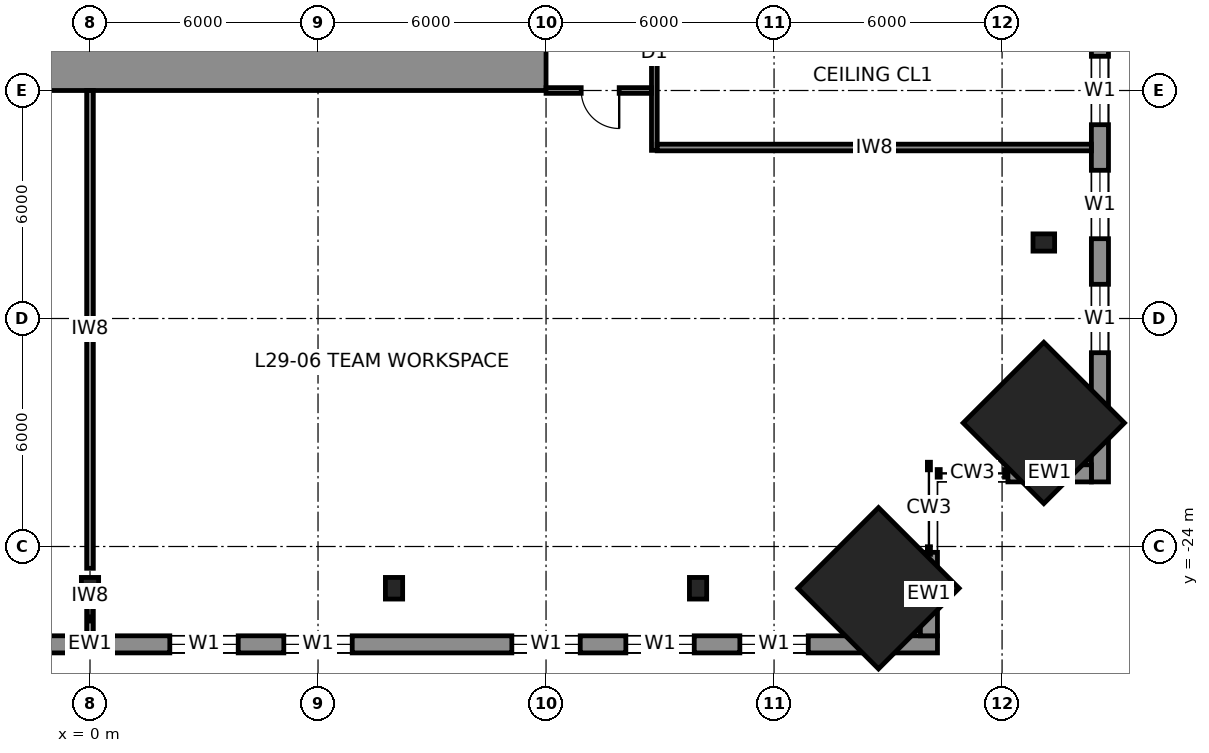
"""IFC4 building model, lengths in metres.
Left out: names, types, materials, properties, quantities, classifications, styles, units other than length and angle.
Written with IfcOpenShell. Run it as: python <this file> out.ifc"""

import sys

from ifc_helpers import new_model, si_unit, direction, frame, frame_2d, origin, origin_2d, place, context, subcontext, project, spatial, rectangle, i_section, extrude, element, fill, save


model = new_model("IFC4")
c1 = context("Model", 3, precision=1e-05, world=origin(), true_north=direction((0.0, 1.0)))
c2 = subcontext(c1, "Body", "Model", "MODEL_VIEW")
j1 = project(units=[si_unit("LENGTHUNIT", "METRE"), si_unit("PLANEANGLEUNIT", "RADIAN")], contexts=[c1])
p1 = place(None, origin())
s1 = spatial("IfcSite", under=j1, at=p1, CompositionType="ELEMENT")
p2 = place(p1, origin())
s2 = spatial("IfcBuilding", under=s1, at=p2, CompositionType="ELEMENT")
p3 = place(p2, frame((0.0, 0.0, 143.8)))
s3 = spatial("IfcBuildingStorey", under=s2, at=p3, CompositionType="ELEMENT", Elevation=143.8)
for number, where, z_axis, x_axis in (
    (1, (25.098, -20.748, 0.0), (-0.04, 0.04, 0.998), (-0.707, -0.708, 0.0)),
    (2, (20.748, -25.098, 0.0), (-0.04, 0.04, 0.998), (-0.708, -0.707, 0.0)),
):
    element("IfcColumn", number, at=place(p3, frame(where, z_axis=z_axis, x_axis=x_axis)), inside=s3, PredefinedType="COLUMN", context=c2, shape_type="SweptSolid", body=[
        extrude(rectangle(XDim=3.0, YDim=3.0, at=origin_2d()), origin(), (0.0, 0.0, 1.0), 4.007),
    ])
for number, where, z_axis, x_axis in (
    (3, (25.098, -16.0, 0.0), (-0.04, 0.0, 0.999), (0.0, -1.0, 0.0)),
    (4, (0.0, -25.098, 0.0), (0.0, 0.04, 0.999), (-1.0, 0.0, 0.0)),
    (5, (8.0, -25.098, 0.0), (0.0, 0.04, 0.999), (-1.0, 0.0, 0.0)),
    (6, (16.0, -25.098, 0.0), (0.0, 0.04, 0.999), (-1.0, 0.0, 0.0)),
):
    element("IfcColumn", number, at=place(p3, frame(where, z_axis=z_axis, x_axis=x_axis)), inside=s3, PredefinedType="COLUMN", context=c2, shape_type="SweptSolid", body=[
        extrude(i_section(OverallWidth=0.454, OverallDepth=0.569, WebThickness=0.078, FlangeThickness=0.125, at=origin_2d()), origin(), (0.0, 0.0, 1.0), 4.003),
    ])
p4 = place(p3, frame((12.0, -11.25, 0.0), z_axis=(0.0, 0.0, 1.0), x_axis=(-1.0, 0.0, 0.0)))
e7 = element("IfcWall", 7, at=p4, inside=s3, PredefinedType="SHEAR", context=c2, shape_type="SweptSolid", body=[
    extrude(rectangle(XDim=24.0, YDim=1.5, at=frame_2d((12.0, 0.0))), origin(), (0.0, 0.0, 1.0), 4.0),
])
p5 = place(p3, frame((26.575, -22.3, 0.0), z_axis=(0.0, 0.0, 1.0), x_axis=(0.0, 1.0, 0.0)))
e8 = element("IfcWall", 8, at=p5, inside=s3, PredefinedType="SOLIDWALL", context=c2, shape_type="SweptSolid", body=[
    extrude(rectangle(XDim=44.6, YDim=0.45, at=frame_2d((22.3, 0.0))), origin(), (0.0, 0.0, 1.0), 3.83),
])
p6 = place(p5, frame((3.4, 0.0, 0.7)))
e9 = element("IfcOpeningElement", 9, at=p6, cuts=e8, PredefinedType="OPENING", context=c2, shape_type="SweptSolid", body=[
    extrude(rectangle(XDim=1.8, YDim=2.6, at=frame_2d((0.9, 1.3))), frame((0.0, 0.235, 0.0), z_axis=(0.0, -1.0, 0.0), x_axis=(1.0, 0.0, 0.0)), (0.0, 0.0, 1.0), 0.47),
])
p7 = place(p5, frame((6.4, 0.0, 0.7)))
e10 = element("IfcOpeningElement", 10, at=p7, cuts=e8, PredefinedType="OPENING", context=c2, shape_type="SweptSolid", body=[
    extrude(rectangle(XDim=1.8, YDim=2.6, at=frame_2d((0.9, 1.3))), frame((0.0, 0.235, 0.0), z_axis=(0.0, -1.0, 0.0), x_axis=(1.0, 0.0, 0.0)), (0.0, 0.0, 1.0), 0.47),
])
p8 = place(p5, frame((9.4, 0.0, 0.7)))
e11 = element("IfcOpeningElement", 11, at=p8, cuts=e8, PredefinedType="OPENING", context=c2, shape_type="SweptSolid", body=[
    extrude(rectangle(XDim=1.8, YDim=2.6, at=frame_2d((0.9, 1.3))), frame((0.0, 0.235, 0.0), z_axis=(0.0, -1.0, 0.0), x_axis=(1.0, 0.0, 0.0)), (0.0, 0.0, 1.0), 0.47),
])
p9 = place(p5, frame((15.4, 0.0, 0.7)))
e12 = element("IfcOpeningElement", 12, at=p9, cuts=e8, PredefinedType="OPENING", context=c2, shape_type="SweptSolid", body=[
    extrude(rectangle(XDim=1.8, YDim=2.6, at=frame_2d((0.9, 1.3))), frame((0.0, 0.235, 0.0), z_axis=(0.0, -1.0, 0.0), x_axis=(1.0, 0.0, 0.0)), (0.0, 0.0, 1.0), 0.47),
])
p10 = place(p5, frame((18.4, 0.0, 0.7)))
e13 = element("IfcOpeningElement", 13, at=p10, cuts=e8, PredefinedType="OPENING", context=c2, shape_type="SweptSolid", body=[
    extrude(rectangle(XDim=1.8, YDim=2.6, at=frame_2d((0.9, 1.3))), frame((0.0, 0.235, 0.0), z_axis=(0.0, -1.0, 0.0), x_axis=(1.0, 0.0, 0.0)), (0.0, 0.0, 1.0), 0.47),
])
p11 = place(p5, frame((24.4, 0.0, 0.7)))
e14 = element("IfcOpeningElement", 14, at=p11, cuts=e8, PredefinedType="OPENING", context=c2, shape_type="SweptSolid", body=[
    extrude(rectangle(XDim=1.8, YDim=2.6, at=frame_2d((0.9, 1.3))), frame((0.0, 0.235, 0.0), z_axis=(0.0, -1.0, 0.0), x_axis=(1.0, 0.0, 0.0)), (0.0, 0.0, 1.0), 0.47),
])
p12 = place(p5, frame((27.4, 0.0, 0.7)))
e15 = element("IfcOpeningElement", 15, at=p12, cuts=e8, PredefinedType="OPENING", context=c2, shape_type="SweptSolid", body=[
    extrude(rectangle(XDim=1.8, YDim=2.6, at=frame_2d((0.9, 1.3))), frame((0.0, 0.235, 0.0), z_axis=(0.0, -1.0, 0.0), x_axis=(1.0, 0.0, 0.0)), (0.0, 0.0, 1.0), 0.47),
])
p13 = place(p5, frame((33.4, 0.0, 0.7)))
e16 = element("IfcOpeningElement", 16, at=p13, cuts=e8, PredefinedType="OPENING", context=c2, shape_type="SweptSolid", body=[
    extrude(rectangle(XDim=1.8, YDim=2.6, at=frame_2d((0.9, 1.3))), frame((0.0, 0.235, 0.0), z_axis=(0.0, -1.0, 0.0), x_axis=(1.0, 0.0, 0.0)), (0.0, 0.0, 1.0), 0.47),
])
p14 = place(p5, frame((36.4, 0.0, 0.7)))
e17 = element("IfcOpeningElement", 17, at=p14, cuts=e8, PredefinedType="OPENING", context=c2, shape_type="SweptSolid", body=[
    extrude(rectangle(XDim=1.8, YDim=2.6, at=frame_2d((0.9, 1.3))), frame((0.0, 0.235, 0.0), z_axis=(0.0, -1.0, 0.0), x_axis=(1.0, 0.0, 0.0)), (0.0, 0.0, 1.0), 0.47),
])
p15 = place(p5, frame((39.4, 0.0, 0.7)))
e18 = element("IfcOpeningElement", 18, at=p15, cuts=e8, PredefinedType="OPENING", context=c2, shape_type="SweptSolid", body=[
    extrude(rectangle(XDim=1.8, YDim=2.6, at=frame_2d((0.9, 1.3))), frame((0.0, 0.235, 0.0), z_axis=(0.0, -1.0, 0.0), x_axis=(1.0, 0.0, 0.0)), (0.0, 0.0, 1.0), 0.47),
])
p16 = place(p3, frame((-22.3, -26.575, 0.0), z_axis=(0.0, 0.0, 1.0), x_axis=(1.0, 0.0, 0.0)))
e19 = element("IfcWall", 19, at=p16, inside=s3, PredefinedType="SOLIDWALL", context=c2, shape_type="SweptSolid", body=[
    extrude(rectangle(XDim=44.6, YDim=0.45, at=frame_2d((22.3, 0.0))), origin(), (0.0, 0.0, 1.0), 3.83),
])
p17 = place(p16, frame((3.4, 0.0, 0.7)))
e20 = element("IfcOpeningElement", 20, at=p17, cuts=e19, PredefinedType="OPENING", context=c2, shape_type="SweptSolid", body=[
    extrude(rectangle(XDim=1.8, YDim=2.6, at=frame_2d((0.9, 1.3))), frame((0.0, 0.235, 0.0), z_axis=(0.0, -1.0, 0.0), x_axis=(1.0, 0.0, 0.0)), (0.0, 0.0, 1.0), 0.47),
])
p18 = place(p16, frame((6.4, 0.0, 0.7)))
e21 = element("IfcOpeningElement", 21, at=p18, cuts=e19, PredefinedType="OPENING", context=c2, shape_type="SweptSolid", body=[
    extrude(rectangle(XDim=1.8, YDim=2.6, at=frame_2d((0.9, 1.3))), frame((0.0, 0.235, 0.0), z_axis=(0.0, -1.0, 0.0), x_axis=(1.0, 0.0, 0.0)), (0.0, 0.0, 1.0), 0.47),
])
p19 = place(p16, frame((9.4, 0.0, 0.7)))
e22 = element("IfcOpeningElement", 22, at=p19, cuts=e19, PredefinedType="OPENING", context=c2, shape_type="SweptSolid", body=[
    extrude(rectangle(XDim=1.8, YDim=2.6, at=frame_2d((0.9, 1.3))), frame((0.0, 0.235, 0.0), z_axis=(0.0, -1.0, 0.0), x_axis=(1.0, 0.0, 0.0)), (0.0, 0.0, 1.0), 0.47),
])
p20 = place(p16, frame((15.4, 0.0, 0.7)))
e23 = element("IfcOpeningElement", 23, at=p20, cuts=e19, PredefinedType="OPENING", context=c2, shape_type="SweptSolid", body=[
    extrude(rectangle(XDim=1.8, YDim=2.6, at=frame_2d((0.9, 1.3))), frame((0.0, 0.235, 0.0), z_axis=(0.0, -1.0, 0.0), x_axis=(1.0, 0.0, 0.0)), (0.0, 0.0, 1.0), 0.47),
])
p21 = place(p16, frame((18.4, 0.0, 0.7)))
e24 = element("IfcOpeningElement", 24, at=p21, cuts=e19, PredefinedType="OPENING", context=c2, shape_type="SweptSolid", body=[
    extrude(rectangle(XDim=1.8, YDim=2.6, at=frame_2d((0.9, 1.3))), frame((0.0, 0.235, 0.0), z_axis=(0.0, -1.0, 0.0), x_axis=(1.0, 0.0, 0.0)), (0.0, 0.0, 1.0), 0.47),
])
p22 = place(p16, frame((24.4, 0.0, 0.7)))
e25 = element("IfcOpeningElement", 25, at=p22, cuts=e19, PredefinedType="OPENING", context=c2, shape_type="SweptSolid", body=[
    extrude(rectangle(XDim=1.8, YDim=2.6, at=frame_2d((0.9, 1.3))), frame((0.0, 0.235, 0.0), z_axis=(0.0, -1.0, 0.0), x_axis=(1.0, 0.0, 0.0)), (0.0, 0.0, 1.0), 0.47),
])
p23 = place(p16, frame((27.4, 0.0, 0.7)))
e26 = element("IfcOpeningElement", 26, at=p23, cuts=e19, PredefinedType="OPENING", context=c2, shape_type="SweptSolid", body=[
    extrude(rectangle(XDim=1.8, YDim=2.6, at=frame_2d((0.9, 1.3))), frame((0.0, 0.235, 0.0), z_axis=(0.0, -1.0, 0.0), x_axis=(1.0, 0.0, 0.0)), (0.0, 0.0, 1.0), 0.47),
])
p24 = place(p16, frame((33.4, 0.0, 0.7)))
e27 = element("IfcOpeningElement", 27, at=p24, cuts=e19, PredefinedType="OPENING", context=c2, shape_type="SweptSolid", body=[
    extrude(rectangle(XDim=1.8, YDim=2.6, at=frame_2d((0.9, 1.3))), frame((0.0, 0.235, 0.0), z_axis=(0.0, -1.0, 0.0), x_axis=(1.0, 0.0, 0.0)), (0.0, 0.0, 1.0), 0.47),
])
p25 = place(p16, frame((36.4, 0.0, 0.7)))
e28 = element("IfcOpeningElement", 28, at=p25, cuts=e19, PredefinedType="OPENING", context=c2, shape_type="SweptSolid", body=[
    extrude(rectangle(XDim=1.8, YDim=2.6, at=frame_2d((0.9, 1.3))), frame((0.0, 0.235, 0.0), z_axis=(0.0, -1.0, 0.0), x_axis=(1.0, 0.0, 0.0)), (0.0, 0.0, 1.0), 0.47),
])
p26 = place(p16, frame((39.4, 0.0, 0.7)))
e29 = element("IfcOpeningElement", 29, at=p26, cuts=e19, PredefinedType="OPENING", context=c2, shape_type="SweptSolid", body=[
    extrude(rectangle(XDim=1.8, YDim=2.6, at=frame_2d((0.9, 1.3))), frame((0.0, 0.235, 0.0), z_axis=(0.0, -1.0, 0.0), x_axis=(1.0, 0.0, 0.0)), (0.0, 0.0, 1.0), 0.47),
])
for number, where, z_axis, x_axis in (
    (30, (22.075, -24.154, 0.0), (0.0, 0.0, 1.0), (0.0, -1.0, 0.0)),
    (31, (24.154, -22.075, 0.0), (0.0, 0.0, 1.0), (1.0, 0.0, 0.0)),
):
    element("IfcWall", number, at=place(p3, frame(where, z_axis=z_axis, x_axis=x_axis)), inside=s3, PredefinedType="SOLIDWALL", context=c2, shape_type="SweptSolid", body=[
        extrude(rectangle(XDim=2.197, YDim=0.45, at=frame_2d((1.098, 0.0))), origin(), (0.0, 0.0, 1.0), 3.83),
    ])
p27 = place(p3, frame((14.85, -13.575, 0.0), z_axis=(0.0, 0.0, 1.0), x_axis=(0.0, 1.0, 0.0)))
e32 = element("IfcWall", 32, at=p27, inside=s3, PredefinedType="PARTITIONING", context=c2, shape_type="SweptSolid", body=[
    extrude(rectangle(XDim=28.35, YDim=0.15, at=frame_2d((14.175, 0.0))), origin(), (0.0, 0.0, 1.0), 3.83),
])
p28 = place(p27, frame((3.175, 0.0, 0.0)))
e33 = element("IfcOpeningElement", 33, at=p28, cuts=e32, PredefinedType="OPENING", context=c2, shape_type="SweptSolid", body=[
    extrude(rectangle(XDim=1.0, YDim=2.3, at=frame_2d((0.5, 1.15))), frame((0.0, 0.085, 0.0), z_axis=(0.0, -1.0, 0.0), x_axis=(1.0, 0.0, 0.0)), (0.0, 0.0, 1.0), 0.17),
])
p29 = place(p27, frame((7.375, 0.0, 0.0)))
e34 = element("IfcOpeningElement", 34, at=p29, cuts=e32, PredefinedType="OPENING", context=c2, shape_type="SweptSolid", body=[
    extrude(rectangle(XDim=1.0, YDim=2.3, at=frame_2d((0.5, 1.15))), frame((0.0, 0.085, 0.0), z_axis=(0.0, -1.0, 0.0), x_axis=(1.0, 0.0, 0.0)), (0.0, 0.0, 1.0), 0.17),
])
p30 = place(p27, frame((19.275, 0.0, 0.0)))
e35 = element("IfcOpeningElement", 35, at=p30, cuts=e32, PredefinedType="OPENING", context=c2, shape_type="SweptSolid", body=[
    extrude(rectangle(XDim=1.0, YDim=2.3, at=frame_2d((0.5, 1.15))), frame((0.0, 0.085, 0.0), z_axis=(0.0, -1.0, 0.0), x_axis=(1.0, 0.0, 0.0)), (0.0, 0.0, 1.0), 0.17),
])
p31 = place(p27, frame((23.725, 0.0, 0.0)))
e36 = element("IfcOpeningElement", 36, at=p31, cuts=e32, PredefinedType="OPENING", context=c2, shape_type="SweptSolid", body=[
    extrude(rectangle(XDim=1.0, YDim=2.3, at=frame_2d((0.5, 1.15))), frame((0.0, 0.085, 0.0), z_axis=(0.0, -1.0, 0.0), x_axis=(1.0, 0.0, 0.0)), (0.0, 0.0, 1.0), 0.17),
])
p32 = place(p27, frame((15.825, 0.0, 0.0)))
e37 = element("IfcOpeningElement", 37, at=p32, cuts=e32, PredefinedType="OPENING", context=c2, shape_type="SweptSolid", body=[
    extrude(rectangle(XDim=1.0, YDim=2.3, at=frame_2d((0.5, 1.15))), frame((0.0, 0.085, 0.0), z_axis=(0.0, -1.0, 0.0), x_axis=(1.0, 0.0, 0.0)), (0.0, 0.0, 1.0), 0.17),
])
p33 = place(p27, frame((11.075, 0.0, 0.0)))
e38 = element("IfcOpeningElement", 38, at=p33, cuts=e32, PredefinedType="OPENING", context=c2, shape_type="SweptSolid", body=[
    extrude(rectangle(XDim=1.0, YDim=2.3, at=frame_2d((0.5, 1.15))), frame((0.0, 0.085, 0.0), z_axis=(0.0, -1.0, 0.0), x_axis=(1.0, 0.0, 0.0)), (0.0, 0.0, 1.0), 0.17),
])
p34 = place(p3, frame((14.775, -12.0, 0.0), z_axis=(0.0, 0.0, 1.0), x_axis=(-1.0, 0.0, 0.0)))
e39 = element("IfcWall", 39, at=p34, inside=s3, PredefinedType="PARTITIONING", context=c2, shape_type="SweptSolid", body=[
    extrude(rectangle(XDim=2.775, YDim=0.15, at=frame_2d((1.387, 0.0))), origin(), (0.0, 0.0, 1.0), 3.83),
])
p35 = place(p34, frame((0.85, 0.0, 0.0)))
e40 = element("IfcOpeningElement", 40, at=p35, cuts=e39, PredefinedType="OPENING", context=c2, shape_type="SweptSolid", body=[
    extrude(rectangle(XDim=1.0, YDim=2.3, at=frame_2d((0.5, 1.15))), frame((0.0, 0.085, 0.0), z_axis=(0.0, -1.0, 0.0), x_axis=(1.0, 0.0, 0.0)), (0.0, 0.0, 1.0), 0.17),
])
p36 = place(p3, frame((26.35, -13.5, 0.0), z_axis=(0.0, 0.0, 1.0), x_axis=(-1.0, 0.0, 0.0)))
e41 = element("IfcWall", 41, at=p36, inside=s3, PredefinedType="PARTITIONING", context=c2, shape_type="SweptSolid", body=[
    extrude(rectangle(XDim=11.425, YDim=0.175, at=frame_2d((5.712, 0.0))), origin(), (0.0, 0.0, 1.0), 3.83),
])
p37 = place(p3, frame((0.0, -12.0, 0.0), z_axis=(0.0, 0.0, 1.0), x_axis=(0.0, -1.0, 0.0)))
e42 = element("IfcWall", 42, at=p37, inside=s3, PredefinedType="PARTITIONING", context=c2, shape_type="SweptSolid", body=[
    extrude(rectangle(XDim=12.573, YDim=0.175, at=frame_2d((6.287, 0.0))), origin(), (0.0, 0.0, 1.0), 2.83),
])
p38 = place(p3, frame((0.0, -25.462, 0.0), z_axis=(0.0, 0.0, 1.0), x_axis=(0.0, -1.0, 0.0)))
e43 = element("IfcWall", 43, at=p38, inside=s3, PredefinedType="PARTITIONING", context=c2, shape_type="SweptSolid", body=[
    extrude(rectangle(XDim=0.888, YDim=0.175, at=frame_2d((0.444, 0.0))), origin(), (0.0, 0.0, 1.0), 3.83),
])
p39 = place(p6, origin())
e44 = element("IfcWindow", 44, at=p39, inside=s3, PartitioningType="SINGLE_PANEL", PredefinedType="WINDOW", context=c2, shape_type="SweptSolid", body=[
    extrude(rectangle(XDim=1.8, YDim=2.6, at=frame_2d((0.9, 1.3))), frame((0.0, 0.03, 0.0), z_axis=(0.0, -1.0, 0.0), x_axis=(1.0, 0.0, 0.0)), (0.0, 0.0, 1.0), 0.06),
])
fill(e9, e44)
p40 = place(p7, origin())
e45 = element("IfcWindow", 45, at=p40, inside=s3, PartitioningType="SINGLE_PANEL", PredefinedType="WINDOW", context=c2, shape_type="SweptSolid", body=[
    extrude(rectangle(XDim=1.8, YDim=2.6, at=frame_2d((0.9, 1.3))), frame((0.0, 0.03, 0.0), z_axis=(0.0, -1.0, 0.0), x_axis=(1.0, 0.0, 0.0)), (0.0, 0.0, 1.0), 0.06),
])
fill(e10, e45)
p41 = place(p8, origin())
e46 = element("IfcWindow", 46, at=p41, inside=s3, PartitioningType="SINGLE_PANEL", PredefinedType="WINDOW", context=c2, shape_type="SweptSolid", body=[
    extrude(rectangle(XDim=1.8, YDim=2.6, at=frame_2d((0.9, 1.3))), frame((0.0, 0.03, 0.0), z_axis=(0.0, -1.0, 0.0), x_axis=(1.0, 0.0, 0.0)), (0.0, 0.0, 1.0), 0.06),
])
fill(e11, e46)
p42 = place(p22, origin())
e47 = element("IfcWindow", 47, at=p42, inside=s3, PartitioningType="SINGLE_PANEL", PredefinedType="WINDOW", context=c2, shape_type="SweptSolid", body=[
    extrude(rectangle(XDim=1.8, YDim=2.6, at=frame_2d((0.9, 1.3))), frame((0.0, 0.03, 0.0), z_axis=(0.0, -1.0, 0.0), x_axis=(1.0, 0.0, 0.0)), (0.0, 0.0, 1.0), 0.06),
])
fill(e25, e47)
p43 = place(p23, origin())
e48 = element("IfcWindow", 48, at=p43, inside=s3, PartitioningType="SINGLE_PANEL", PredefinedType="WINDOW", context=c2, shape_type="SweptSolid", body=[
    extrude(rectangle(XDim=1.8, YDim=2.6, at=frame_2d((0.9, 1.3))), frame((0.0, 0.03, 0.0), z_axis=(0.0, -1.0, 0.0), x_axis=(1.0, 0.0, 0.0)), (0.0, 0.0, 1.0), 0.06),
])
fill(e26, e48)
p44 = place(p24, origin())
e49 = element("IfcWindow", 49, at=p44, inside=s3, PartitioningType="SINGLE_PANEL", PredefinedType="WINDOW", context=c2, shape_type="SweptSolid", body=[
    extrude(rectangle(XDim=1.8, YDim=2.6, at=frame_2d((0.9, 1.3))), frame((0.0, 0.03, 0.0), z_axis=(0.0, -1.0, 0.0), x_axis=(1.0, 0.0, 0.0)), (0.0, 0.0, 1.0), 0.06),
])
fill(e27, e49)
p45 = place(p25, origin())
e50 = element("IfcWindow", 50, at=p45, inside=s3, PartitioningType="SINGLE_PANEL", PredefinedType="WINDOW", context=c2, shape_type="SweptSolid", body=[
    extrude(rectangle(XDim=1.8, YDim=2.6, at=frame_2d((0.9, 1.3))), frame((0.0, 0.03, 0.0), z_axis=(0.0, -1.0, 0.0), x_axis=(1.0, 0.0, 0.0)), (0.0, 0.0, 1.0), 0.06),
])
fill(e28, e50)
p46 = place(p26, origin())
e51 = element("IfcWindow", 51, at=p46, inside=s3, PartitioningType="SINGLE_PANEL", PredefinedType="WINDOW", context=c2, shape_type="SweptSolid", body=[
    extrude(rectangle(XDim=1.8, YDim=2.6, at=frame_2d((0.9, 1.3))), frame((0.0, 0.03, 0.0), z_axis=(0.0, -1.0, 0.0), x_axis=(1.0, 0.0, 0.0)), (0.0, 0.0, 1.0), 0.06),
])
fill(e29, e51)
p47 = place(p35, origin())
e52 = element("IfcDoor", 52, at=p47, inside=s3, OperationType="SINGLE_SWING_LEFT", PredefinedType="DOOR", context=c2, shape_type="SweptSolid", body=[
    extrude(rectangle(XDim=1.0, YDim=2.3, at=frame_2d((0.5, 1.15))), frame((0.0, 0.025, 0.0), z_axis=(0.0, -1.0, 0.0), x_axis=(1.0, 0.0, 0.0)), (0.0, 0.0, 1.0), 0.05),
])
fill(e40, e52)
save(model, sys.argv[1])
